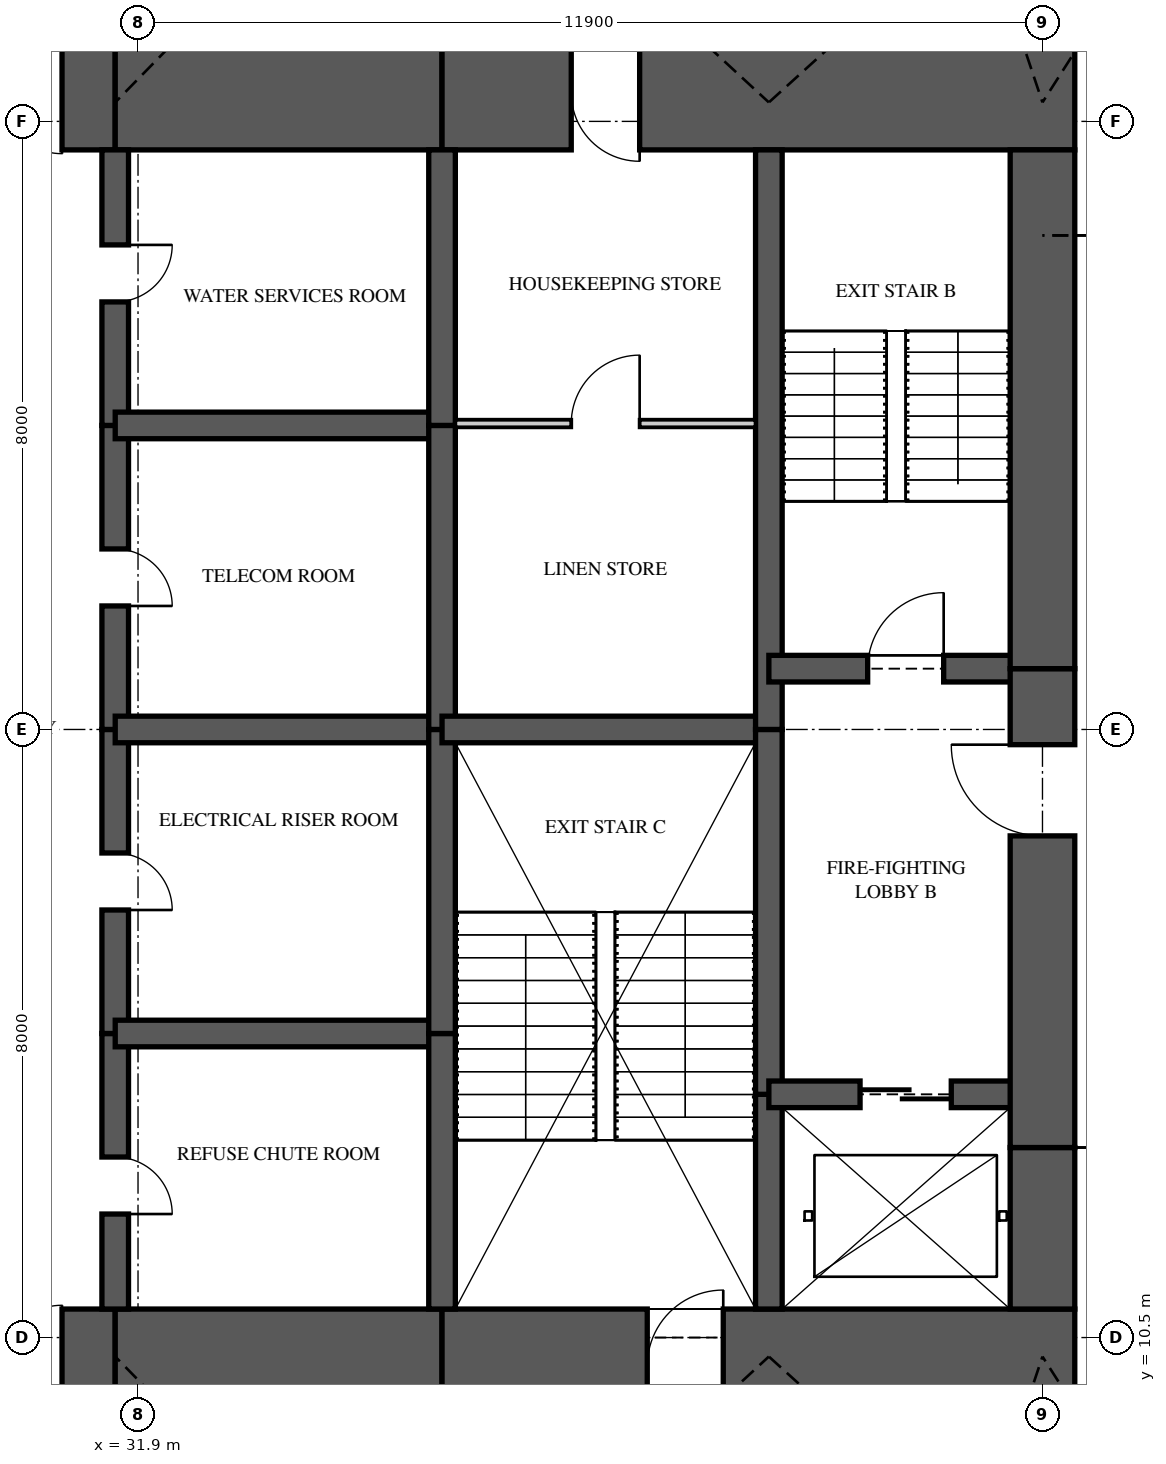
"""IFC4 building model, lengths in metres.
Left out: names, types, materials, properties, quantities, classifications, styles, units other than length and angle.
Written with IfcOpenShell. Run it as: python <this file> out.ifc"""

import sys

from ifc_helpers import new_model, si_unit, direction, frame, frame_2d, origin, place, context, subcontext, project, spatial, rectangle, extrude, element, fill, save


model = new_model("IFC4")
c1 = context("Model", 3, precision=1e-05, world=origin(), true_north=direction((0.0, 1.0)))
c2 = subcontext(c1, "Body", "Model", "MODEL_VIEW")
j1 = project(units=[si_unit("LENGTHUNIT", "METRE"), si_unit("PLANEANGLEUNIT", "RADIAN")], contexts=[c1])
p1 = place(None, origin())
s1 = spatial("IfcSite", under=j1, at=p1, CompositionType="ELEMENT")
p2 = place(p1, origin())
s2 = spatial("IfcBuilding", under=s1, at=p2, CompositionType="ELEMENT")
p3 = place(p2, frame((0.0, 0.0, 144.35)))
s3 = spatial("IfcBuildingStorey", under=s2, at=p3, CompositionType="ELEMENT", Elevation=144.35)
p4 = place(p3, frame((26.0, 10.125, 0.0), z_axis=(0.0, 0.0, 1.0), x_axis=(1.0, 0.0, 0.0)))
e1 = element("IfcWall", 1, at=p4, inside=s3, PredefinedType="SHEAR", context=c2, shape_type="SweptSolid", body=[
    extrude(rectangle(XDim=5.6, YDim=1.5, at=frame_2d((2.8, 0.0))), origin(), (0.0, 0.0, 1.0), 5.0),
])
p5 = place(p4, frame((3.3, 0.0, 0.0)))
e2 = element("IfcOpeningElement", 2, at=p5, cuts=e1, PredefinedType="OPENING", context=c2, shape_type="SweptSolid", body=[
    extrude(rectangle(XDim=1.6, YDim=2.1, at=frame_2d((0.8, 1.05))), frame((0.0, 0.76, 0.0), z_axis=(0.0, -1.0, 0.0), x_axis=(1.0, 0.0, 0.0)), (0.0, 0.0, 1.0), 1.52),
])
p6 = place(p3, frame((31.6, 10.125, 0.0), z_axis=(0.0, 0.0, 1.0), x_axis=(1.0, 0.0, 0.0)))
e3 = element("IfcWall", 3, at=p6, inside=s3, PredefinedType="SHEAR", context=c2, shape_type="SweptSolid", body=[
    extrude(rectangle(XDim=4.3, YDim=1.5, at=frame_2d((2.15, 0.0))), origin(), (0.0, 0.0, 1.0), 5.0),
])
p7 = place(p3, frame((35.9, 10.125, 0.0), z_axis=(0.0, 0.0, 1.0), x_axis=(1.0, 0.0, 0.0)))
e4 = element("IfcWall", 4, at=p7, inside=s3, PredefinedType="SHEAR", context=c2, shape_type="SweptSolid", body=[
    extrude(rectangle(XDim=8.325, YDim=1.5, at=frame_2d((4.163, 0.0))), origin(), (0.0, 0.0, 1.0), 5.0),
])
p8 = place(p7, frame((2.7, 0.0, 0.0)))
e5 = element("IfcOpeningElement", 5, at=p8, cuts=e4, PredefinedType="OPENING", context=c2, shape_type="SweptSolid", body=[
    extrude(rectangle(XDim=1.0, YDim=2.1, at=frame_2d((0.5, 1.05))), frame((0.0, 0.76, 0.0), z_axis=(0.0, -1.0, 0.0), x_axis=(1.0, 0.0, 0.0)), (0.0, 0.0, 1.0), 1.52),
])
p9 = place(p3, frame((44.225, 26.875, 0.0), z_axis=(0.0, 0.0, 1.0), x_axis=(-1.0, 0.0, 0.0)))
e6 = element("IfcWall", 6, at=p9, inside=s3, PredefinedType="SHEAR", context=c2, shape_type="SweptSolid", body=[
    extrude(rectangle(XDim=8.325, YDim=1.5, at=frame_2d((4.163, 0.0))), origin(), (0.0, 0.0, 1.0), 5.0),
])
p10 = place(p9, frame((5.725, 0.0, 0.0)))
e7 = element("IfcOpeningElement", 7, at=p10, cuts=e6, PredefinedType="OPENING", context=c2, shape_type="SweptSolid", body=[
    extrude(rectangle(XDim=0.9, YDim=2.1, at=frame_2d((0.45, 1.05))), frame((0.0, 0.76, 0.0), z_axis=(0.0, -1.0, 0.0), x_axis=(1.0, 0.0, 0.0)), (0.0, 0.0, 1.0), 1.52),
])
p11 = place(p3, frame((35.9, 26.875, 0.0), z_axis=(0.0, 0.0, 1.0), x_axis=(-1.0, 0.0, 0.0)))
e8 = element("IfcWall", 8, at=p11, inside=s3, PredefinedType="SHEAR", context=c2, shape_type="SweptSolid", body=[
    extrude(rectangle(XDim=4.3, YDim=1.5, at=frame_2d((2.15, 0.0))), origin(), (0.0, 0.0, 1.0), 5.0),
])
p12 = place(p3, frame((31.6, 26.875, 0.0), z_axis=(0.0, 0.0, 1.0), x_axis=(-1.0, 0.0, 0.0)))
e9 = element("IfcWall", 9, at=p12, inside=s3, PredefinedType="SHEAR", context=c2, shape_type="SweptSolid", body=[
    extrude(rectangle(XDim=5.6, YDim=1.5, at=frame_2d((2.8, 0.0))), origin(), (0.0, 0.0, 1.0), 5.0),
])
p13 = place(p12, frame((0.7, 0.0, 0.0)))
e10 = element("IfcOpeningElement", 10, at=p13, cuts=e9, PredefinedType="OPENING", context=c2, shape_type="SweptSolid", body=[
    extrude(rectangle(XDim=1.6, YDim=2.1, at=frame_2d((0.8, 1.05))), frame((0.0, 0.76, 0.0), z_axis=(0.0, -1.0, 0.0), x_axis=(1.0, 0.0, 0.0)), (0.0, 0.0, 1.0), 1.52),
])
p14 = place(p3, frame((43.8, 10.875, 0.0), z_axis=(0.0, 0.0, 1.0), x_axis=(0.0, 1.0, 0.0)))
e11 = element("IfcWall", 11, at=p14, inside=s3, PredefinedType="SHEAR", context=c2, shape_type="SweptSolid", body=[
    extrude(rectangle(XDim=2.125, YDim=0.85, at=frame_2d((1.062, 0.0))), origin(), (0.0, 0.0, 1.0), 5.0),
])
p15 = place(p3, frame((43.8, 13.0, 0.0), z_axis=(0.0, 0.0, 1.0), x_axis=(0.0, 1.0, 0.0)))
e12 = element("IfcWall", 12, at=p15, inside=s3, PredefinedType="SHEAR", context=c2, shape_type="SweptSolid", body=[
    extrude(rectangle(XDim=6.3, YDim=0.85, at=frame_2d((3.15, 0.0))), origin(), (0.0, 0.0, 1.0), 5.0),
])
p16 = place(p15, frame((4.1, 0.0, 0.0)))
e13 = element("IfcOpeningElement", 13, at=p16, cuts=e12, PredefinedType="OPENING", context=c2, shape_type="SweptSolid", body=[
    extrude(rectangle(XDim=1.2, YDim=2.2, at=frame_2d((0.6, 1.1))), frame((0.0, 0.435, 0.0), z_axis=(0.0, -1.0, 0.0), x_axis=(1.0, 0.0, 0.0)), (0.0, 0.0, 1.0), 0.87),
])
p17 = place(p3, frame((43.8, 19.3, 0.0), z_axis=(0.0, 0.0, 1.0), x_axis=(0.0, 1.0, 0.0)))
e14 = element("IfcWall", 14, at=p17, inside=s3, PredefinedType="SHEAR", context=c2, shape_type="SweptSolid", body=[
    extrude(rectangle(XDim=6.825, YDim=0.85, at=frame_2d((3.413, 0.0))), origin(), (0.0, 0.0, 1.0), 5.0),
])
p18 = place(p3, frame((31.6, 10.875, 0.0), z_axis=(0.0, 0.0, 1.0), x_axis=(0.0, 1.0, 0.0)))
e15 = element("IfcWall", 15, at=p18, inside=s3, PredefinedType="SHEAR", context=c2, shape_type="SweptSolid", body=[
    extrude(rectangle(XDim=3.625, YDim=0.35, at=frame_2d((1.812, 0.0))), origin(), (0.0, 0.0, 1.0), 5.0),
])
p19 = place(p18, frame((1.25, 0.0, 0.0)))
e16 = element("IfcOpeningElement", 16, at=p19, cuts=e15, PredefinedType="OPENING", context=c2, shape_type="SweptSolid", body=[
    extrude(rectangle(XDim=0.75, YDim=2.1, at=frame_2d((0.375, 1.05))), frame((0.0, 0.185, 0.0), z_axis=(0.0, -1.0, 0.0), x_axis=(1.0, 0.0, 0.0)), (0.0, 0.0, 1.0), 0.37),
])
p20 = place(p3, frame((31.6, 14.5, 0.0), z_axis=(0.0, 0.0, 1.0), x_axis=(0.0, 1.0, 0.0)))
e17 = element("IfcWall", 17, at=p20, inside=s3, PredefinedType="SHEAR", context=c2, shape_type="SweptSolid", body=[
    extrude(rectangle(XDim=4.0, YDim=0.35, at=frame_2d((2.0, 0.0))), origin(), (0.0, 0.0, 1.0), 5.0),
])
p21 = place(p20, frame((1.625, 0.0, 0.0)))
e18 = element("IfcOpeningElement", 18, at=p21, cuts=e17, PredefinedType="OPENING", context=c2, shape_type="SweptSolid", body=[
    extrude(rectangle(XDim=0.75, YDim=2.1, at=frame_2d((0.375, 1.05))), frame((0.0, 0.185, 0.0), z_axis=(0.0, -1.0, 0.0), x_axis=(1.0, 0.0, 0.0)), (0.0, 0.0, 1.0), 0.37),
])
p22 = place(p3, frame((31.6, 18.5, 0.0), z_axis=(0.0, 0.0, 1.0), x_axis=(0.0, 1.0, 0.0)))
e19 = element("IfcWall", 19, at=p22, inside=s3, PredefinedType="SHEAR", context=c2, shape_type="SweptSolid", body=[
    extrude(rectangle(XDim=4.0, YDim=0.35, at=frame_2d((2.0, 0.0))), origin(), (0.0, 0.0, 1.0), 5.0),
])
p23 = place(p22, frame((1.625, 0.0, 0.0)))
e20 = element("IfcOpeningElement", 20, at=p23, cuts=e19, PredefinedType="OPENING", context=c2, shape_type="SweptSolid", body=[
    extrude(rectangle(XDim=0.75, YDim=2.1, at=frame_2d((0.375, 1.05))), frame((0.0, 0.185, 0.0), z_axis=(0.0, -1.0, 0.0), x_axis=(1.0, 0.0, 0.0)), (0.0, 0.0, 1.0), 0.37),
])
p24 = place(p3, frame((31.6, 22.5, 0.0), z_axis=(0.0, 0.0, 1.0), x_axis=(0.0, 1.0, 0.0)))
e21 = element("IfcWall", 21, at=p24, inside=s3, PredefinedType="SHEAR", context=c2, shape_type="SweptSolid", body=[
    extrude(rectangle(XDim=3.625, YDim=0.35, at=frame_2d((1.812, 0.0))), origin(), (0.0, 0.0, 1.0), 5.0),
])
p25 = place(p24, frame((1.625, 0.0, 0.0)))
e22 = element("IfcOpeningElement", 22, at=p25, cuts=e21, PredefinedType="OPENING", context=c2, shape_type="SweptSolid", body=[
    extrude(rectangle(XDim=0.75, YDim=2.1, at=frame_2d((0.375, 1.05))), frame((0.0, 0.185, 0.0), z_axis=(0.0, -1.0, 0.0), x_axis=(1.0, 0.0, 0.0)), (0.0, 0.0, 1.0), 0.37),
])
p26 = place(p3, frame((35.9, 10.875, 0.0), z_axis=(0.0, 0.0, 1.0), x_axis=(0.0, 1.0, 0.0)))
e23 = element("IfcWall", 23, at=p26, inside=s3, PredefinedType="SHEAR", context=c2, shape_type="SweptSolid", body=[
    extrude(rectangle(XDim=3.625, YDim=0.35, at=frame_2d((1.812, 0.0))), origin(), (0.0, 0.0, 1.0), 5.0),
])
for number, where, z_axis, x_axis in (
    (24, (35.9, 14.5, 0.0), (0.0, 0.0, 1.0), (0.0, 1.0, 0.0)),
    (25, (35.9, 18.5, 0.0), (0.0, 0.0, 1.0), (0.0, 1.0, 0.0)),
):
    element("IfcWall", number, at=place(p3, frame(where, z_axis=z_axis, x_axis=x_axis)), inside=s3, PredefinedType="SHEAR", context=c2, shape_type="SweptSolid", body=[
        extrude(rectangle(XDim=4.0, YDim=0.35, at=frame_2d((2.0, 0.0))), origin(), (0.0, 0.0, 1.0), 5.0),
    ])
p27 = place(p3, frame((35.9, 22.5, 0.0), z_axis=(0.0, 0.0, 1.0), x_axis=(0.0, 1.0, 0.0)))
e26 = element("IfcWall", 26, at=p27, inside=s3, PredefinedType="SHEAR", context=c2, shape_type="SweptSolid", body=[
    extrude(rectangle(XDim=3.625, YDim=0.35, at=frame_2d((1.812, 0.0))), origin(), (0.0, 0.0, 1.0), 5.0),
])
p28 = place(p3, frame((40.2, 10.875, 0.0), z_axis=(0.0, 0.0, 1.0), x_axis=(0.0, 1.0, 0.0)))
e27 = element("IfcWall", 27, at=p28, inside=s3, PredefinedType="SHEAR", context=c2, shape_type="SweptSolid", body=[
    extrude(rectangle(XDim=2.825, YDim=0.35, at=frame_2d((1.413, 0.0))), origin(), (0.0, 0.0, 1.0), 5.0),
])
p29 = place(p3, frame((40.2, 13.7, 0.0), z_axis=(0.0, 0.0, 1.0), x_axis=(0.0, 1.0, 0.0)))
e28 = element("IfcWall", 28, at=p29, inside=s3, PredefinedType="SHEAR", context=c2, shape_type="SweptSolid", body=[
    extrude(rectangle(XDim=4.8, YDim=0.35, at=frame_2d((2.4, 0.0))), origin(), (0.0, 0.0, 1.0), 5.0),
])
p30 = place(p3, frame((40.2, 18.5, 0.0), z_axis=(0.0, 0.0, 1.0), x_axis=(0.0, 1.0, 0.0)))
e29 = element("IfcWall", 29, at=p30, inside=s3, PredefinedType="SHEAR", context=c2, shape_type="SweptSolid", body=[
    extrude(rectangle(XDim=7.625, YDim=0.35, at=frame_2d((3.812, 0.0))), origin(), (0.0, 0.0, 1.0), 5.0),
])
for number, where, z_axis, x_axis in (
    (30, (31.6, 14.5, 0.0), (0.0, 0.0, 1.0), (1.0, 0.0, 0.0)),
    (31, (31.6, 18.5, 0.0), (0.0, 0.0, 1.0), (1.0, 0.0, 0.0)),
    (32, (31.6, 22.5, 0.0), (0.0, 0.0, 1.0), (1.0, 0.0, 0.0)),
):
    element("IfcWall", number, at=place(p3, frame(where, z_axis=z_axis, x_axis=x_axis)), inside=s3, PredefinedType="SHEAR", context=c2, shape_type="SweptSolid", body=[
        extrude(rectangle(XDim=4.3, YDim=0.35, at=frame_2d((2.15, 0.0))), origin(), (0.0, 0.0, 1.0), 5.0),
    ])
p31 = place(p3, frame((35.9, 18.5, 0.0), z_axis=(0.0, 0.0, 1.0), x_axis=(1.0, 0.0, 0.0)))
e33 = element("IfcWall", 33, at=p31, inside=s3, PredefinedType="SHEAR", context=c2, shape_type="SweptSolid", body=[
    extrude(rectangle(XDim=4.3, YDim=0.35, at=frame_2d((2.15, 0.0))), origin(), (0.0, 0.0, 1.0), 5.0),
])
p32 = place(p3, frame((40.2, 13.7, 0.0), z_axis=(0.0, 0.0, 1.0), x_axis=(1.0, 0.0, 0.0)))
e34 = element("IfcWall", 34, at=p32, inside=s3, PredefinedType="SHEAR", context=c2, shape_type="SweptSolid", body=[
    extrude(rectangle(XDim=3.6, YDim=0.35, at=frame_2d((1.8, 0.0))), origin(), (0.0, 0.0, 1.0), 5.0),
])
p33 = place(p32, frame((1.2, 0.0, 0.0)))
e35 = element("IfcOpeningElement", 35, at=p33, cuts=e34, PredefinedType="OPENING", context=c2, shape_type="SweptSolid", body=[
    extrude(rectangle(XDim=1.2, YDim=2.1, at=frame_2d((0.6, 1.05))), frame((0.0, 0.185, 0.0), z_axis=(0.0, -1.0, 0.0), x_axis=(1.0, 0.0, 0.0)), (0.0, 0.0, 1.0), 0.37),
])
p34 = place(p3, frame((40.2, 19.3, 0.0), z_axis=(0.0, 0.0, 1.0), x_axis=(1.0, 0.0, 0.0)))
e36 = element("IfcWall", 36, at=p34, inside=s3, PredefinedType="SHEAR", context=c2, shape_type="SweptSolid", body=[
    extrude(rectangle(XDim=3.6, YDim=0.35, at=frame_2d((1.8, 0.0))), origin(), (0.0, 0.0, 1.0), 5.0),
])
p35 = place(p34, frame((1.3, 0.0, 0.0)))
e37 = element("IfcOpeningElement", 37, at=p35, cuts=e36, PredefinedType="OPENING", context=c2, shape_type="SweptSolid", body=[
    extrude(rectangle(XDim=1.0, YDim=2.1, at=frame_2d((0.5, 1.05))), frame((0.0, 0.185, 0.0), z_axis=(0.0, -1.0, 0.0), x_axis=(1.0, 0.0, 0.0)), (0.0, 0.0, 1.0), 0.37),
])
p36 = place(p3, frame((36.075, 22.525, 0.0), z_axis=(0.0, 0.0, 1.0), x_axis=(1.0, 0.0, 0.0)))
e38 = element("IfcWall", 38, at=p36, inside=s3, PredefinedType="PARTITIONING", context=c2, shape_type="SweptSolid", body=[
    extrude(rectangle(XDim=3.95, YDim=0.1, at=frame_2d((1.975, 0.0))), origin(), (0.0, 0.0, 1.0), 4.72),
])
p37 = place(p36, frame((1.525, 0.0, 0.0)))
e39 = element("IfcOpeningElement", 39, at=p37, cuts=e38, PredefinedType="OPENING", context=c2, shape_type="SweptSolid", body=[
    extrude(rectangle(XDim=0.9, YDim=2.1, at=frame_2d((0.45, 1.05))), frame((0.0, 0.06, 0.0), z_axis=(0.0, -1.0, 0.0), x_axis=(1.0, 0.0, 0.0)), (0.0, 0.0, 1.0), 0.12),
])
p38 = place(p37, origin())
e40 = element("IfcDoor", 40, at=p38, inside=s3, OperationType="SINGLE_SWING_RIGHT", PredefinedType="DOOR", context=c2, shape_type="SweptSolid", body=[
    extrude(rectangle(XDim=0.9, YDim=2.1, at=frame_2d((0.45, 1.05))), frame((0.0, 0.025, 0.0), z_axis=(0.0, -1.0, 0.0), x_axis=(1.0, 0.0, 0.0)), (0.0, 0.0, 1.0), 0.05),
])
fill(e39, e40)
p39 = place(p35, origin())
e41 = element("IfcDoor", 41, at=p39, inside=s3, OperationType="SINGLE_SWING_RIGHT", PredefinedType="DOOR", context=c2, shape_type="SweptSolid", body=[
    extrude(rectangle(XDim=1.0, YDim=2.1, at=frame_2d((0.5, 1.05))), frame((0.0, 0.025, 0.0), z_axis=(0.0, -1.0, 0.0), x_axis=(1.0, 0.0, 0.0)), (0.0, 0.0, 1.0), 0.05),
])
fill(e37, e41)
p40 = place(p16, origin())
e42 = element("IfcDoor", 42, at=p40, inside=s3, OperationType="SINGLE_SWING_RIGHT", PredefinedType="DOOR", context=c2, shape_type="SweptSolid", body=[
    extrude(rectangle(XDim=1.2, YDim=2.2, at=frame_2d((0.6, 1.1))), frame((0.0, 0.025, 0.0), z_axis=(0.0, -1.0, 0.0), x_axis=(1.0, 0.0, 0.0)), (0.0, 0.0, 1.0), 0.05),
])
fill(e13, e42)
p41 = place(p33, origin())
e43 = element("IfcDoor", 43, at=p41, inside=s3, OperationType="SLIDING_TO_LEFT", PredefinedType="DOOR", context=c2, shape_type="SweptSolid", body=[
    extrude(rectangle(XDim=1.2, YDim=2.1, at=frame_2d((0.6, 1.05))), frame((0.0, 0.025, 0.0), z_axis=(0.0, -1.0, 0.0), x_axis=(1.0, 0.0, 0.0)), (0.0, 0.0, 1.0), 0.05),
])
fill(e35, e43)
p42 = place(p5, origin())
e44 = element("IfcDoor", 44, at=p42, inside=s3, OperationType="DOUBLE_DOOR_SINGLE_SWING", PredefinedType="DOOR", context=c2, shape_type="SweptSolid", body=[
    extrude(rectangle(XDim=1.6, YDim=2.1, at=frame_2d((0.8, 1.05))), frame((0.0, 0.025, 0.0), z_axis=(0.0, -1.0, 0.0), x_axis=(1.0, 0.0, 0.0)), (0.0, 0.0, 1.0), 0.05),
])
fill(e2, e44)
p43 = place(p13, origin())
e45 = element("IfcDoor", 45, at=p43, inside=s3, OperationType="DOUBLE_DOOR_SINGLE_SWING", PredefinedType="DOOR", context=c2, shape_type="SweptSolid", body=[
    extrude(rectangle(XDim=1.6, YDim=2.1, at=frame_2d((0.8, 1.05))), frame((0.0, 0.025, 0.0), z_axis=(0.0, -1.0, 0.0), x_axis=(1.0, 0.0, 0.0)), (0.0, 0.0, 1.0), 0.05),
])
fill(e10, e45)
p44 = place(p19, frame((0.75, 0.0, 0.0), z_axis=(0.0, 0.0, 1.0), x_axis=(-1.0, 0.0, 0.0)))
e46 = element("IfcDoor", 46, at=p44, inside=s3, OperationType="SINGLE_SWING_RIGHT", PredefinedType="DOOR", context=c2, shape_type="SweptSolid", body=[
    extrude(rectangle(XDim=0.75, YDim=2.1, at=frame_2d((0.375, 1.05))), frame((0.0, 0.025, 0.0), z_axis=(0.0, -1.0, 0.0), x_axis=(1.0, 0.0, 0.0)), (0.0, 0.0, 1.0), 0.05),
])
fill(e16, e46)
p45 = place(p21, frame((0.75, 0.0, 0.0), z_axis=(0.0, 0.0, 1.0), x_axis=(-1.0, 0.0, 0.0)))
e47 = element("IfcDoor", 47, at=p45, inside=s3, OperationType="SINGLE_SWING_RIGHT", PredefinedType="DOOR", context=c2, shape_type="SweptSolid", body=[
    extrude(rectangle(XDim=0.75, YDim=2.1, at=frame_2d((0.375, 1.05))), frame((0.0, 0.025, 0.0), z_axis=(0.0, -1.0, 0.0), x_axis=(1.0, 0.0, 0.0)), (0.0, 0.0, 1.0), 0.05),
])
fill(e18, e47)
p46 = place(p23, frame((0.75, 0.0, 0.0), z_axis=(0.0, 0.0, 1.0), x_axis=(-1.0, 0.0, 0.0)))
e48 = element("IfcDoor", 48, at=p46, inside=s3, OperationType="SINGLE_SWING_RIGHT", PredefinedType="DOOR", context=c2, shape_type="SweptSolid", body=[
    extrude(rectangle(XDim=0.75, YDim=2.1, at=frame_2d((0.375, 1.05))), frame((0.0, 0.025, 0.0), z_axis=(0.0, -1.0, 0.0), x_axis=(1.0, 0.0, 0.0)), (0.0, 0.0, 1.0), 0.05),
])
fill(e20, e48)
p47 = place(p25, frame((0.75, 0.0, 0.0), z_axis=(0.0, 0.0, 1.0), x_axis=(-1.0, 0.0, 0.0)))
e49 = element("IfcDoor", 49, at=p47, inside=s3, OperationType="SINGLE_SWING_LEFT", PredefinedType="DOOR", context=c2, shape_type="SweptSolid", body=[
    extrude(rectangle(XDim=0.75, YDim=2.1, at=frame_2d((0.375, 1.05))), frame((0.0, 0.025, 0.0), z_axis=(0.0, -1.0, 0.0), x_axis=(1.0, 0.0, 0.0)), (0.0, 0.0, 1.0), 0.05),
])
fill(e22, e49)
p48 = place(p8, origin())
e50 = element("IfcDoor", 50, at=p48, inside=s3, OperationType="SINGLE_SWING_RIGHT", PredefinedType="DOOR", context=c2, shape_type="SweptSolid", body=[
    extrude(rectangle(XDim=1.0, YDim=2.1, at=frame_2d((0.5, 1.05))), frame((0.0, 0.025, 0.0), z_axis=(0.0, -1.0, 0.0), x_axis=(1.0, 0.0, 0.0)), (0.0, 0.0, 1.0), 0.05),
])
fill(e5, e50)
p49 = place(p10, origin())
e51 = element("IfcDoor", 51, at=p49, inside=s3, OperationType="SINGLE_SWING_LEFT", PredefinedType="DOOR", context=c2, shape_type="SweptSolid", body=[
    extrude(rectangle(XDim=0.9, YDim=2.1, at=frame_2d((0.45, 1.05))), frame((0.0, 0.47, 0.0), z_axis=(0.0, -1.0, 0.0), x_axis=(1.0, 0.0, 0.0)), (0.0, 0.0, 1.0), 0.8),
])
fill(e7, e51)
save(model, sys.argv[1])
